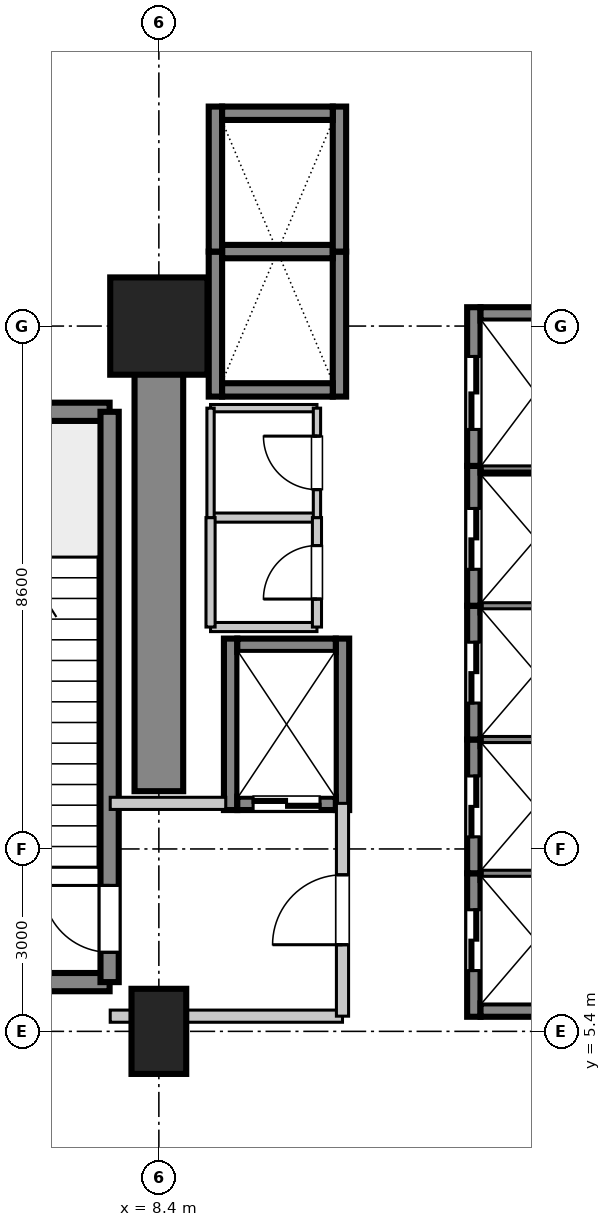
"""IFC4 building model, lengths in metres.
Left out: names, types, materials, properties, quantities, classifications, styles, units other than length and angle.
Written with IfcOpenShell. Run it as: python <this file> out.ifc"""

import sys

from ifc_helpers import new_model, si_unit, direction, frame, frame_2d, origin, origin_2d, place, context, subcontext, project, spatial, rectangle, extrude, source, transform, mapped, element, fill, save


model = new_model("IFC4")
c1 = context("Model", 3, precision=1e-05, world=origin(), true_north=direction((0.0, 1.0)))
c2 = subcontext(c1, "Body", "Model", "MODEL_VIEW")
j1 = project(units=[si_unit("LENGTHUNIT", "METRE"), si_unit("PLANEANGLEUNIT", "RADIAN")], contexts=[c1])
p1 = place(None, origin())
s1 = spatial("IfcSite", under=j1, at=p1, CompositionType="ELEMENT")
p2 = place(p1, origin())
s2 = spatial("IfcBuilding", under=s1, at=p2, CompositionType="ELEMENT")
p3 = place(p2, frame((0.0, 0.0, 27.0)))
s3 = spatial("IfcBuildingStorey", under=s2, at=p3, CompositionType="ELEMENT", Elevation=27.0)
m1 = source(origin(), c2, "Body", "SweptSolid", [
    extrude(rectangle(XDim=0.9, YDim=1.4, at=origin_2d()), origin(), (0.0, 0.0, 1.0), 5.355),
])
p4 = place(p3, frame((8.4, 5.4, 0.0), z_axis=(0.0, 0.0, 1.0), x_axis=(1.0, 0.0, 0.0)))
e1 = element("IfcColumn", 1, at=p4, inside=s3, PredefinedType="PILASTER", context=c2, shape_type="MappedRepresentation", body=[
    mapped(m1, transform((0.0, 0.0, 0.0), scale=1.0)),
])
m2 = source(origin(), c2, "Body", "SweptSolid", [
    extrude(rectangle(XDim=1.6, YDim=1.6, at=origin_2d()), origin(), (0.0, 0.0, 1.0), 5.355),
])
p5 = place(p3, frame((8.4, 17.0, 0.0), z_axis=(0.0, 0.0, 1.0), x_axis=(1.0, 0.0, 0.0)))
e2 = element("IfcColumn", 2, at=p5, inside=s3, PredefinedType="COLUMN", context=c2, shape_type="MappedRepresentation", body=[
    mapped(m2, transform((0.0, 0.0, 0.0), scale=1.0)),
])
m3 = source(origin(), c2, "Body", "SweptSolid", [
    extrude(rectangle(XDim=7.65, YDim=0.8, at=frame_2d((3.825, 0.0))), origin(), (0.0, 0.0, 1.0), 5.12),
])
p6 = place(p3, frame((8.4, 9.35, 0.0), z_axis=(0.0, 0.0, 1.0), x_axis=(0.0, 1.0, 0.0)))
e3 = element("IfcWall", 3, at=p6, inside=s3, PredefinedType="SHEAR", context=c2, shape_type="MappedRepresentation", body=[
    mapped(m3, transform((0.0, 0.0, 0.0), scale=1.0)),
])
m4 = source(origin(), c2, "Body", "SweptSolid", [
    extrude(rectangle(XDim=3.98, YDim=0.3, at=frame_2d((1.99, 0.0))), origin(), (0.0, 0.0, 1.0), 5.12),
])
for number, where, z_axis, x_axis in (
    (4, (3.61, 6.21, 0.0), (0.0, 0.0, 1.0), (1.0, 0.0, 0.0)),
    (5, (3.61, 15.59, 0.0), (0.0, 0.0, 1.0), (1.0, 0.0, 0.0)),
):
    element("IfcWall", number, at=place(p3, frame(where, z_axis=z_axis, x_axis=x_axis)), inside=s3, PredefinedType="SHEAR", context=c2, shape_type="MappedRepresentation", body=[
        mapped(m4, transform((0.0, 0.0, 0.0), scale=1.0)),
    ])
m5 = source(origin(), c2, "Body", "SweptSolid", [
    extrude(rectangle(XDim=9.38, YDim=0.3, at=frame_2d((4.69, 0.0))), origin(), (0.0, 0.0, 1.0), 5.12),
])
p7 = place(p3, frame((7.59, 6.21, 0.0), z_axis=(0.0, 0.0, 1.0), x_axis=(0.0, 1.0, 0.0)))
e6 = element("IfcWall", 6, at=p7, inside=s3, PredefinedType="SHEAR", context=c2, shape_type="MappedRepresentation", body=[
    mapped(m5, transform((0.0, 0.0, 0.0), scale=1.0)),
])
p8 = place(p7, frame((0.49, 0.0, 0.0)))
e7 = element("IfcOpeningElement", 7, at=p8, cuts=e6, PredefinedType="OPENING", context=c2, shape_type="SweptSolid", body=[
    extrude(rectangle(XDim=1.1, YDim=2.15, at=frame_2d((0.55, 1.075))), frame((0.0, 0.16, 0.0), z_axis=(0.0, -1.0, 0.0), x_axis=(1.0, 0.0, 0.0)), (0.0, 0.0, 1.0), 0.32),
])
m6 = source(origin(), c2, "Body", "SweptSolid", [
    extrude(rectangle(XDim=2.36, YDim=0.22, at=frame_2d((1.18, 0.0))), origin(), (0.0, 0.0, 1.0), 5.12),
])
p9 = place(p3, frame((13.58, 5.64, 0.0), z_axis=(0.0, 0.0, 1.0), x_axis=(0.0, 1.0, 0.0)))
e8 = element("IfcWall", 8, at=p9, inside=s3, PredefinedType="SHEAR", context=c2, shape_type="MappedRepresentation", body=[
    mapped(m6, transform((0.0, 0.0, 0.0), scale=1.0)),
])
p10 = place(p9, frame((0.76, 0.0, 0.0)))
e9 = element("IfcOpeningElement", 9, at=p10, cuts=e8, PredefinedType="OPENING", context=c2, shape_type="SweptSolid", body=[
    extrude(rectangle(XDim=1.0, YDim=2.2, at=frame_2d((0.5, 1.1))), frame((0.0, 0.12, 0.0), z_axis=(0.0, -1.0, 0.0), x_axis=(1.0, 0.0, 0.0)), (0.0, 0.0, 1.0), 0.24),
])
m7 = source(origin(), c2, "Body", "SweptSolid", [
    extrude(rectangle(XDim=1.82, YDim=0.22, at=frame_2d((0.91, 0.0))), origin(), (0.0, 0.0, 1.0), 5.12),
])
p11 = place(p3, frame((13.69, 5.75, 0.0), z_axis=(0.0, 0.0, 1.0), x_axis=(1.0, 0.0, 0.0)))
e10 = element("IfcWall", 10, at=p11, inside=s3, PredefinedType="SHEAR", context=c2, shape_type="MappedRepresentation", body=[
    mapped(m7, transform((0.0, 0.0, 0.0), scale=1.0)),
])
m8 = source(origin(), c2, "Body", "SweptSolid", [
    extrude(rectangle(XDim=1.82, YDim=0.22, at=frame_2d((0.91, 0.0))), origin(), (0.0, 0.0, 1.0), 5.4),
])
p12 = place(p3, frame((13.69, 8.0, 0.0), z_axis=(0.0, 0.0, 1.0), x_axis=(1.0, 0.0, 0.0)))
e11 = element("IfcWall", 11, at=p12, inside=s3, PredefinedType="SHEAR", context=c2, shape_type="MappedRepresentation", body=[
    mapped(m8, transform((0.0, 0.0, 0.0), scale=1.0)),
])
m9 = source(origin(), c2, "Body", "SweptSolid", [
    extrude(rectangle(XDim=2.2, YDim=0.22, at=frame_2d((1.1, 0.0))), origin(), (0.0, 0.0, 1.0), 5.12),
])
p13 = place(p3, frame((13.58, 8.0, 0.0), z_axis=(0.0, 0.0, 1.0), x_axis=(0.0, 1.0, 0.0)))
e12 = element("IfcWall", 12, at=p13, inside=s3, PredefinedType="SHEAR", context=c2, shape_type="MappedRepresentation", body=[
    mapped(m9, transform((0.0, 0.0, 0.0), scale=1.0)),
])
p14 = place(p13, frame((0.6, 0.0, 0.0)))
e13 = element("IfcOpeningElement", 13, at=p14, cuts=e12, PredefinedType="OPENING", context=c2, shape_type="SweptSolid", body=[
    extrude(rectangle(XDim=1.0, YDim=2.2, at=frame_2d((0.5, 1.1))), frame((0.0, 0.12, 0.0), z_axis=(0.0, -1.0, 0.0), x_axis=(1.0, 0.0, 0.0)), (0.0, 0.0, 1.0), 0.24),
])
p15 = place(p3, frame((13.69, 10.2, 0.0), z_axis=(0.0, 0.0, 1.0), x_axis=(1.0, 0.0, 0.0)))
e14 = element("IfcWall", 14, at=p15, inside=s3, PredefinedType="SHEAR", context=c2, shape_type="MappedRepresentation", body=[
    mapped(m8, transform((0.0, 0.0, 0.0), scale=1.0)),
])
p16 = place(p3, frame((13.58, 10.2, 0.0), z_axis=(0.0, 0.0, 1.0), x_axis=(0.0, 1.0, 0.0)))
e15 = element("IfcWall", 15, at=p16, inside=s3, PredefinedType="SHEAR", context=c2, shape_type="MappedRepresentation", body=[
    mapped(m9, transform((0.0, 0.0, 0.0), scale=1.0)),
])
p17 = place(p16, frame((0.6, 0.0, 0.0)))
e16 = element("IfcOpeningElement", 16, at=p17, cuts=e15, PredefinedType="OPENING", context=c2, shape_type="SweptSolid", body=[
    extrude(rectangle(XDim=1.0, YDim=2.2, at=frame_2d((0.5, 1.1))), frame((0.0, 0.12, 0.0), z_axis=(0.0, -1.0, 0.0), x_axis=(1.0, 0.0, 0.0)), (0.0, 0.0, 1.0), 0.24),
])
p18 = place(p3, frame((13.69, 12.4, 0.0), z_axis=(0.0, 0.0, 1.0), x_axis=(1.0, 0.0, 0.0)))
e17 = element("IfcWall", 17, at=p18, inside=s3, PredefinedType="SHEAR", context=c2, shape_type="MappedRepresentation", body=[
    mapped(m8, transform((0.0, 0.0, 0.0), scale=1.0)),
])
m10 = source(origin(), c2, "Body", "SweptSolid", [
    extrude(rectangle(XDim=2.3, YDim=0.22, at=frame_2d((1.15, 0.0))), origin(), (0.0, 0.0, 1.0), 5.12),
])
p19 = place(p3, frame((13.58, 12.4, 0.0), z_axis=(0.0, 0.0, 1.0), x_axis=(0.0, 1.0, 0.0)))
e18 = element("IfcWall", 18, at=p19, inside=s3, PredefinedType="SHEAR", context=c2, shape_type="MappedRepresentation", body=[
    mapped(m10, transform((0.0, 0.0, 0.0), scale=1.0)),
])
p20 = place(p19, frame((0.6, 0.0, 0.0)))
e19 = element("IfcOpeningElement", 19, at=p20, cuts=e18, PredefinedType="OPENING", context=c2, shape_type="SweptSolid", body=[
    extrude(rectangle(XDim=1.0, YDim=2.2, at=frame_2d((0.5, 1.1))), frame((0.0, 0.12, 0.0), z_axis=(0.0, -1.0, 0.0), x_axis=(1.0, 0.0, 0.0)), (0.0, 0.0, 1.0), 0.24),
])
p21 = place(p3, frame((13.69, 14.7, 0.0), z_axis=(0.0, 0.0, 1.0), x_axis=(1.0, 0.0, 0.0)))
e20 = element("IfcWall", 20, at=p21, inside=s3, PredefinedType="SHEAR", context=c2, shape_type="MappedRepresentation", body=[
    mapped(m8, transform((0.0, 0.0, 0.0), scale=1.0)),
])
m11 = source(origin(), c2, "Body", "SweptSolid", [
    extrude(rectangle(XDim=2.385, YDim=0.22, at=frame_2d((1.192, 0.0))), origin(), (0.0, 0.0, 1.0), 5.12),
])
for number, where, z_axis, x_axis in (
    (21, (9.33, 15.84, 0.0), (0.0, 0.0, 1.0), (0.0, 1.0, 0.0)),
    (22, (11.37, 15.84, 0.0), (0.0, 0.0, 1.0), (0.0, 1.0, 0.0)),
):
    element("IfcWall", number, at=place(p3, frame(where, z_axis=z_axis, x_axis=x_axis)), inside=s3, PredefinedType="SHEAR", context=c2, shape_type="MappedRepresentation", body=[
        mapped(m11, transform((0.0, 0.0, 0.0), scale=1.0)),
    ])
p22 = place(p3, frame((9.44, 15.95, 0.0), z_axis=(0.0, 0.0, 1.0), x_axis=(1.0, 0.0, 0.0)))
e23 = element("IfcWall", 23, at=p22, inside=s3, PredefinedType="SHEAR", context=c2, shape_type="MappedRepresentation", body=[
    mapped(m7, transform((0.0, 0.0, 0.0), scale=1.0)),
])
p23 = place(p3, frame((9.44, 18.225, 0.0), z_axis=(0.0, 0.0, 1.0), x_axis=(1.0, 0.0, 0.0)))
e24 = element("IfcWall", 24, at=p23, inside=s3, PredefinedType="SHEAR", context=c2, shape_type="MappedRepresentation", body=[
    mapped(m8, transform((0.0, 0.0, 0.0), scale=1.0)),
])
for number, where, z_axis, x_axis in (
    (25, (9.33, 18.225, 0.0), (0.0, 0.0, 1.0), (0.0, 1.0, 0.0)),
    (26, (11.37, 18.225, 0.0), (0.0, 0.0, 1.0), (0.0, 1.0, 0.0)),
):
    element("IfcWall", number, at=place(p3, frame(where, z_axis=z_axis, x_axis=x_axis)), inside=s3, PredefinedType="SHEAR", context=c2, shape_type="MappedRepresentation", body=[
        mapped(m11, transform((0.0, 0.0, 0.0), scale=1.0)),
    ])
p24 = place(p3, frame((9.44, 20.5, 0.0), z_axis=(0.0, 0.0, 1.0), x_axis=(1.0, 0.0, 0.0)))
e27 = element("IfcWall", 27, at=p24, inside=s3, PredefinedType="SHEAR", context=c2, shape_type="MappedRepresentation", body=[
    mapped(m7, transform((0.0, 0.0, 0.0), scale=1.0)),
])
m12 = source(origin(), c2, "Body", "SweptSolid", [
    extrude(rectangle(XDim=2.82, YDim=0.22, at=frame_2d((1.41, 0.0))), origin(), (0.0, 0.0, 1.0), 5.12),
])
for number, where, z_axis, x_axis in (
    (28, (9.58, 9.04, 0.0), (0.0, 0.0, 1.0), (0.0, 1.0, 0.0)),
    (29, (11.42, 9.04, 0.0), (0.0, 0.0, 1.0), (0.0, 1.0, 0.0)),
):
    element("IfcWall", number, at=place(p3, frame(where, z_axis=z_axis, x_axis=x_axis)), inside=s3, PredefinedType="SHEAR", context=c2, shape_type="MappedRepresentation", body=[
        mapped(m12, transform((0.0, 0.0, 0.0), scale=1.0)),
    ])
m13 = source(origin(), c2, "Body", "SweptSolid", [
    extrude(rectangle(XDim=1.62, YDim=0.22, at=frame_2d((0.81, 0.0))), origin(), (0.0, 0.0, 1.0), 5.12),
])
p25 = place(p3, frame((9.69, 9.15, 0.0), z_axis=(0.0, 0.0, 1.0), x_axis=(1.0, 0.0, 0.0)))
e30 = element("IfcWall", 30, at=p25, inside=s3, PredefinedType="SHEAR", context=c2, shape_type="MappedRepresentation", body=[
    mapped(m13, transform((0.0, 0.0, 0.0), scale=1.0)),
])
p26 = place(p25, frame((0.26, 0.0, 0.0)))
e31 = element("IfcOpeningElement", 31, at=p26, cuts=e30, PredefinedType="OPENING", context=c2, shape_type="SweptSolid", body=[
    extrude(rectangle(XDim=1.1, YDim=2.2, at=frame_2d((0.55, 1.1))), frame((0.0, 0.12, 0.0), z_axis=(0.0, -1.0, 0.0), x_axis=(1.0, 0.0, 0.0)), (0.0, 0.0, 1.0), 0.24),
])
p27 = place(p3, frame((9.69, 11.75, 0.0), z_axis=(0.0, 0.0, 1.0), x_axis=(1.0, 0.0, 0.0)))
e32 = element("IfcWall", 32, at=p27, inside=s3, PredefinedType="SHEAR", context=c2, shape_type="MappedRepresentation", body=[
    mapped(m13, transform((0.0, 0.0, 0.0), scale=1.0)),
])
m14 = source(origin(), c2, "Body", "SweptSolid", [
    extrude(rectangle(XDim=2.61, YDim=0.22, at=frame_2d((1.305, 0.0))), origin(), (0.0, 0.0, 1.0), 5.12),
])
p28 = place(p3, frame((13.58, 14.7, 0.0), z_axis=(0.0, 0.0, 1.0), x_axis=(0.0, 1.0, 0.0)))
e33 = element("IfcWall", 33, at=p28, inside=s3, PredefinedType="SHEAR", context=c2, shape_type="MappedRepresentation", body=[
    mapped(m14, transform((0.0, 0.0, 0.0), scale=1.0)),
])
p29 = place(p28, frame((0.6, 0.0, 0.0)))
e34 = element("IfcOpeningElement", 34, at=p29, cuts=e33, PredefinedType="OPENING", context=c2, shape_type="SweptSolid", body=[
    extrude(rectangle(XDim=1.2, YDim=2.2, at=frame_2d((0.6, 1.1))), frame((0.0, 0.12, 0.0), z_axis=(0.0, -1.0, 0.0), x_axis=(1.0, 0.0, 0.0)), (0.0, 0.0, 1.0), 0.24),
])
p30 = place(p3, frame((13.69, 17.2, 0.0), z_axis=(0.0, 0.0, 1.0), x_axis=(1.0, 0.0, 0.0)))
e35 = element("IfcWall", 35, at=p30, inside=s3, PredefinedType="SHEAR", context=c2, shape_type="MappedRepresentation", body=[
    mapped(m7, transform((0.0, 0.0, 0.0), scale=1.0)),
])
m15 = source(origin(), c2, "Body", "SweptSolid", [
    extrude(rectangle(XDim=3.82, YDim=0.2, at=frame_2d((1.91, 0.0))), origin(), (0.0, 0.0, 1.0), 3.24),
])
p31 = place(p3, frame((7.6, 5.65, 0.0), z_axis=(0.0, 0.0, 1.0), x_axis=(1.0, 0.0, 0.0)))
e36 = element("IfcWall", 36, at=p31, inside=s3, PredefinedType="PARTITIONING", context=c2, shape_type="MappedRepresentation", body=[
    mapped(m15, transform((0.0, 0.0, 0.0), scale=1.0)),
])
m16 = source(origin(), c2, "Body", "SweptSolid", [
    extrude(rectangle(XDim=1.9, YDim=0.2, at=frame_2d((0.95, 0.0))), origin(), (0.0, 0.0, 1.0), 3.24),
])
p32 = place(p3, frame((7.6, 9.15, 0.0), z_axis=(0.0, 0.0, 1.0), x_axis=(1.0, 0.0, 0.0)))
e37 = element("IfcWall", 37, at=p32, inside=s3, PredefinedType="PARTITIONING", context=c2, shape_type="MappedRepresentation", body=[
    mapped(m16, transform((0.0, 0.0, 0.0), scale=1.0)),
])
m17 = source(origin(), c2, "Body", "SweptSolid", [
    extrude(rectangle(XDim=3.5, YDim=0.2, at=frame_2d((1.75, 0.0))), origin(), (0.0, 0.0, 1.0), 3.24),
])
p33 = place(p3, frame((11.42, 5.65, 0.0), z_axis=(0.0, 0.0, 1.0), x_axis=(0.0, 1.0, 0.0)))
e38 = element("IfcWall", 38, at=p33, inside=s3, PredefinedType="PARTITIONING", context=c2, shape_type="MappedRepresentation", body=[
    mapped(m17, transform((0.0, 0.0, 0.0), scale=1.0)),
])
p34 = place(p33, frame((1.175, 0.0, 0.0)))
e39 = element("IfcOpeningElement", 39, at=p34, cuts=e38, PredefinedType="OPENING", context=c2, shape_type="SweptSolid", body=[
    extrude(rectangle(XDim=1.15, YDim=2.15, at=frame_2d((0.575, 1.075))), frame((0.0, 0.11, 0.0), z_axis=(0.0, -1.0, 0.0), x_axis=(1.0, 0.0, 0.0)), (0.0, 0.0, 1.0), 0.22),
])
m18 = source(origin(), c2, "Body", "SweptSolid", [
    extrude(rectangle(XDim=1.75, YDim=0.15, at=frame_2d((0.875, 0.0))), origin(), (0.0, 0.0, 1.0), 3.24),
])
for number, where, z_axis, x_axis in (
    (40, (9.25, 12.05, 0.0), (0.0, 0.0, 1.0), (1.0, 0.0, 0.0)),
    (41, (9.25, 13.85, 0.0), (0.0, 0.0, 1.0), (1.0, 0.0, 0.0)),
):
    element("IfcWall", number, at=place(p3, frame(where, z_axis=z_axis, x_axis=x_axis)), inside=s3, PredefinedType="PARTITIONING", context=c2, shape_type="MappedRepresentation", body=[
        mapped(m18, transform((0.0, 0.0, 0.0), scale=1.0)),
    ])
m19 = source(origin(), c2, "Body", "SweptSolid", [
    extrude(rectangle(XDim=1.8, YDim=0.15, at=frame_2d((0.9, 0.0))), origin(), (0.0, 0.0, 1.0), 3.24),
])
p35 = place(p3, frame((9.25, 12.05, 0.0), z_axis=(0.0, 0.0, 1.0), x_axis=(0.0, 1.0, 0.0)))
e42 = element("IfcWall", 42, at=p35, inside=s3, PredefinedType="PARTITIONING", context=c2, shape_type="MappedRepresentation", body=[
    mapped(m19, transform((0.0, 0.0, 0.0), scale=1.0)),
])
p36 = place(p3, frame((11.0, 12.05, 0.0), z_axis=(0.0, 0.0, 1.0), x_axis=(0.0, 1.0, 0.0)))
e43 = element("IfcWall", 43, at=p36, inside=s3, PredefinedType="PARTITIONING", context=c2, shape_type="MappedRepresentation", body=[
    mapped(m19, transform((0.0, 0.0, 0.0), scale=1.0)),
])
p37 = place(p36, frame((0.46, 0.0, 0.0)))
e44 = element("IfcOpeningElement", 44, at=p37, cuts=e43, PredefinedType="OPENING", context=c2, shape_type="SweptSolid", body=[
    extrude(rectangle(XDim=0.88, YDim=2.1, at=frame_2d((0.44, 1.05))), frame((0.0, 0.085, 0.0), z_axis=(0.0, -1.0, 0.0), x_axis=(1.0, 0.0, 0.0)), (0.0, 0.0, 1.0), 0.17),
])
m20 = source(origin(), c2, "Body", "SweptSolid", [
    extrude(rectangle(XDim=1.75, YDim=0.12, at=frame_2d((0.875, 0.0))), origin(), (0.0, 0.0, 1.0), 3.24),
])
p38 = place(p3, frame((9.25, 15.65, 0.0), z_axis=(0.0, 0.0, 1.0), x_axis=(1.0, 0.0, 0.0)))
e45 = element("IfcWall", 45, at=p38, inside=s3, PredefinedType="PARTITIONING", context=c2, shape_type="MappedRepresentation", body=[
    mapped(m20, transform((0.0, 0.0, 0.0), scale=1.0)),
])
m21 = source(origin(), c2, "Body", "SweptSolid", [
    extrude(rectangle(XDim=1.8, YDim=0.12, at=frame_2d((0.9, 0.0))), origin(), (0.0, 0.0, 1.0), 3.24),
])
p39 = place(p3, frame((9.25, 13.85, 0.0), z_axis=(0.0, 0.0, 1.0), x_axis=(0.0, 1.0, 0.0)))
e46 = element("IfcWall", 46, at=p39, inside=s3, PredefinedType="PARTITIONING", context=c2, shape_type="MappedRepresentation", body=[
    mapped(m21, transform((0.0, 0.0, 0.0), scale=1.0)),
])
p40 = place(p3, frame((11.0, 13.85, 0.0), z_axis=(0.0, 0.0, 1.0), x_axis=(0.0, 1.0, 0.0)))
e47 = element("IfcWall", 47, at=p40, inside=s3, PredefinedType="PARTITIONING", context=c2, shape_type="MappedRepresentation", body=[
    mapped(m21, transform((0.0, 0.0, 0.0), scale=1.0)),
])
p41 = place(p40, frame((0.46, 0.0, 0.0)))
e48 = element("IfcOpeningElement", 48, at=p41, cuts=e47, PredefinedType="OPENING", context=c2, shape_type="SweptSolid", body=[
    extrude(rectangle(XDim=0.88, YDim=2.1, at=frame_2d((0.44, 1.05))), frame((0.0, 0.07, 0.0), z_axis=(0.0, -1.0, 0.0), x_axis=(1.0, 0.0, 0.0)), (0.0, 0.0, 1.0), 0.14),
])
m22 = source(origin(), c2, "Body", "SweptSolid", [
    extrude(rectangle(XDim=1.1, YDim=2.15, at=frame_2d((0.55, 1.075))), frame((0.0, 0.025, 0.0), z_axis=(0.0, -1.0, 0.0), x_axis=(1.0, 0.0, 0.0)), (0.0, 0.0, 1.0), 0.05),
])
p42 = place(p8, origin())
e49 = element("IfcDoor", 49, at=p42, inside=s3, OperationType="SINGLE_SWING_RIGHT", PredefinedType="DOOR", context=c2, shape_type="MappedRepresentation", body=[
    mapped(m22, transform((0.0, 0.0, 0.0), scale=1.0)),
])
fill(e7, e49)
m23 = source(origin(), c2, "Body", "SweptSolid", [
    extrude(rectangle(XDim=1.0, YDim=2.2, at=frame_2d((0.5, 1.1))), frame((0.0, 0.025, 0.0), z_axis=(0.0, -1.0, 0.0), x_axis=(1.0, 0.0, 0.0)), (0.0, 0.0, 1.0), 0.05),
])
p43 = place(p10, origin())
e50 = element("IfcDoor", 50, at=p43, inside=s3, OperationType="DOUBLE_DOOR_SLIDING", PredefinedType="DOOR", context=c2, shape_type="MappedRepresentation", body=[
    mapped(m23, transform((0.0, 0.0, 0.0), scale=1.0)),
])
fill(e9, e50)
p44 = place(p14, origin())
e51 = element("IfcDoor", 51, at=p44, inside=s3, OperationType="DOUBLE_DOOR_SLIDING", PredefinedType="DOOR", context=c2, shape_type="MappedRepresentation", body=[
    mapped(m23, transform((0.0, 0.0, 0.0), scale=1.0)),
])
fill(e13, e51)
p45 = place(p17, origin())
e52 = element("IfcDoor", 52, at=p45, inside=s3, OperationType="DOUBLE_DOOR_SLIDING", PredefinedType="DOOR", context=c2, shape_type="MappedRepresentation", body=[
    mapped(m23, transform((0.0, 0.0, 0.0), scale=1.0)),
])
fill(e16, e52)
p46 = place(p20, origin())
e53 = element("IfcDoor", 53, at=p46, inside=s3, OperationType="DOUBLE_DOOR_SLIDING", PredefinedType="DOOR", context=c2, shape_type="MappedRepresentation", body=[
    mapped(m23, transform((0.0, 0.0, 0.0), scale=1.0)),
])
fill(e19, e53)
m24 = source(origin(), c2, "Body", "SweptSolid", [
    extrude(rectangle(XDim=1.1, YDim=2.2, at=frame_2d((0.55, 1.1))), frame((0.0, 0.025, 0.0), z_axis=(0.0, -1.0, 0.0), x_axis=(1.0, 0.0, 0.0)), (0.0, 0.0, 1.0), 0.05),
])
p47 = place(p26, frame((1.1, 0.0, 0.0), z_axis=(0.0, 0.0, 1.0), x_axis=(-1.0, 0.0, 0.0)))
e54 = element("IfcDoor", 54, at=p47, inside=s3, OperationType="DOUBLE_DOOR_SLIDING", PredefinedType="DOOR", context=c2, shape_type="MappedRepresentation", body=[
    mapped(m24, transform((0.0, 0.0, 0.0), scale=1.0)),
])
fill(e31, e54)
m25 = source(origin(), c2, "Body", "SweptSolid", [
    extrude(rectangle(XDim=1.2, YDim=2.2, at=frame_2d((0.6, 1.1))), frame((0.0, 0.025, 0.0), z_axis=(0.0, -1.0, 0.0), x_axis=(1.0, 0.0, 0.0)), (0.0, 0.0, 1.0), 0.05),
])
p48 = place(p29, origin())
e55 = element("IfcDoor", 55, at=p48, inside=s3, OperationType="DOUBLE_DOOR_SLIDING", PredefinedType="DOOR", context=c2, shape_type="MappedRepresentation", body=[
    mapped(m25, transform((0.0, 0.0, 0.0), scale=1.0)),
])
fill(e34, e55)
m26 = source(origin(), c2, "Body", "SweptSolid", [
    extrude(rectangle(XDim=1.15, YDim=2.15, at=frame_2d((0.575, 1.075))), frame((0.0, 0.025, 0.0), z_axis=(0.0, -1.0, 0.0), x_axis=(1.0, 0.0, 0.0)), (0.0, 0.0, 1.0), 0.05),
])
p49 = place(p34, frame((1.15, 0.0, 0.0), z_axis=(0.0, 0.0, 1.0), x_axis=(-1.0, 0.0, 0.0)))
e56 = element("IfcDoor", 56, at=p49, inside=s3, OperationType="SINGLE_SWING_LEFT", PredefinedType="DOOR", context=c2, shape_type="MappedRepresentation", body=[
    mapped(m26, transform((0.0, 0.0, 0.0), scale=1.0)),
])
fill(e39, e56)
m27 = source(origin(), c2, "Body", "SweptSolid", [
    extrude(rectangle(XDim=0.88, YDim=2.1, at=frame_2d((0.44, 1.05))), frame((0.0, 0.025, 0.0), z_axis=(0.0, -1.0, 0.0), x_axis=(1.0, 0.0, 0.0)), (0.0, 0.0, 1.0), 0.05),
])
p50 = place(p37, origin())
e57 = element("IfcDoor", 57, at=p50, inside=s3, OperationType="SINGLE_SWING_LEFT", PredefinedType="DOOR", context=c2, shape_type="MappedRepresentation", body=[
    mapped(m27, transform((0.0, 0.0, 0.0), scale=1.0)),
])
fill(e44, e57)
p51 = place(p41, origin())
e58 = element("IfcDoor", 58, at=p51, inside=s3, OperationType="SINGLE_SWING_RIGHT", PredefinedType="DOOR", context=c2, shape_type="MappedRepresentation", body=[
    mapped(m27, transform((0.0, 0.0, 0.0), scale=1.0)),
])
fill(e48, e58)
save(model, sys.argv[1])
